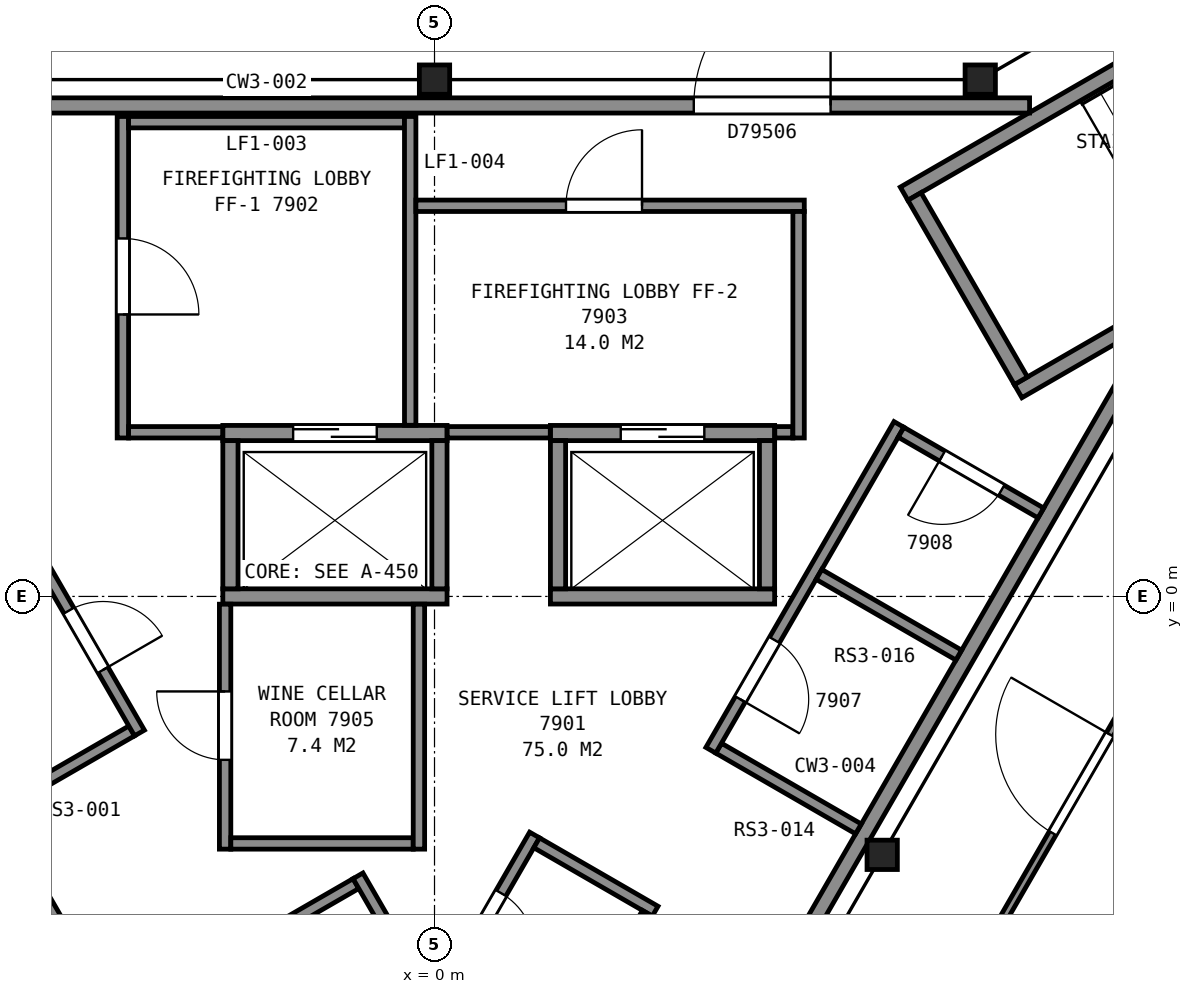
"""IFC4 building model, lengths in metres.
Left out: names, types, materials, properties, quantities, classifications, styles, units other than length and angle.
Written with IfcOpenShell. Run it as: python <this file> out.ifc"""

import sys

from ifc_helpers import new_model, si_unit, direction, frame, frame_2d, origin, origin_2d, place, context, subcontext, project, spatial, rectangle, i_section, extrude, element, fill, save


model = new_model("IFC4")
c1 = context("Model", 3, precision=1e-05, world=origin(), true_north=direction((0.0, 1.0)))
c2 = subcontext(c1, "Body", "Model", "MODEL_VIEW")
j1 = project(units=[si_unit("LENGTHUNIT", "METRE"), si_unit("PLANEANGLEUNIT", "RADIAN")], contexts=[c1])
p1 = place(None, origin())
s1 = spatial("IfcSite", under=j1, at=p1, CompositionType="ELEMENT")
p2 = place(p1, origin())
s2 = spatial("IfcBuilding", under=s1, at=p2, CompositionType="ELEMENT")
p3 = place(p2, frame((0.0, 0.0, 312.6)))
s3 = spatial("IfcBuildingStorey", under=s2, at=p3, CompositionType="ELEMENT", Elevation=312.6)
for number, where, z_axis, x_axis in (
    (1, (7.18, 6.8, 0.0), (0.0, 0.0, 1.0), (1.0, 0.0, 0.0)),
    (2, (0.0, 6.8, 0.0), (0.0, 0.0, 1.0), (1.0, 0.0, 0.0)),
    (3, (5.89, -3.4, 0.0), (0.0, 0.0, 1.0), (1.0, 0.0, 0.0)),
):
    element("IfcColumn", number, at=place(p3, frame(where, z_axis=z_axis, x_axis=x_axis)), inside=s3, PredefinedType="COLUMN", context=c2, shape_type="SweptSolid", body=[
        extrude(i_section(OverallWidth=0.399, OverallDepth=0.386, WebThickness=0.021, FlangeThickness=0.033, FilletRadius=0.015, at=origin_2d()), origin(), (0.0, 0.0, 1.0), 4.2),
    ])
for number, where, z_axis, x_axis in (
    (4, (6.178, 5.299, 0.0), (0.0, 0.0, 1.0), (0.866, 0.5, 0.0)),
    (5, (7.678, 2.701, 0.0), (0.0, 0.0, 1.0), (0.866, 0.5, 0.0)),
):
    element("IfcWall", number, at=place(p3, frame(where, z_axis=z_axis, x_axis=x_axis)), inside=s3, PredefinedType="PARTITIONING", context=c2, shape_type="SweptSolid", body=[
        extrude(rectangle(XDim=7.2, YDim=0.2, at=frame_2d((3.6, 0.0))), origin(), (0.0, 0.0, 1.0), 3.95),
    ])
p4 = place(p3, frame((7.715, 2.838, 0.0), z_axis=(0.0, 0.0, 1.0), x_axis=(-0.500049511043, 0.865996816683, 0.0)))
e6 = element("IfcWall", 6, at=p4, inside=s3, PredefinedType="PARTITIONING", context=c2, shape_type="SweptSolid", body=[
    extrude(rectangle(XDim=2.8, YDim=0.2, at=frame_2d((1.4, 0.0))), origin(), (0.0, 0.0, 1.0), 3.95),
])
p5 = place(p3, frame((-2.785, 0.0, 0.0), z_axis=(0.0, 0.0, 1.0), x_axis=(1.0, 0.0, 0.0)))
e7 = element("IfcWall", 7, at=p5, inside=s3, PredefinedType="PARTITIONING", context=c2, shape_type="SweptSolid", body=[
    extrude(rectangle(XDim=2.95, YDim=0.2, at=frame_2d((1.475, 0.0))), origin(), (0.0, 0.0, 1.0), 4.2),
])
p6 = place(p3, frame((1.525, 0.0, 0.0), z_axis=(0.0, 0.0, 1.0), x_axis=(1.0, 0.0, 0.0)))
e8 = element("IfcWall", 8, at=p6, inside=s3, PredefinedType="PARTITIONING", context=c2, shape_type="SweptSolid", body=[
    extrude(rectangle(XDim=2.95, YDim=0.2, at=frame_2d((1.475, 0.0))), origin(), (0.0, 0.0, 1.0), 4.2),
])
p7 = place(p3, frame((-2.785, 2.15, 0.0), z_axis=(0.0, 0.0, 1.0), x_axis=(1.0, 0.0, 0.0)))
e9 = element("IfcWall", 9, at=p7, inside=s3, PredefinedType="PARTITIONING", context=c2, shape_type="SweptSolid", body=[
    extrude(rectangle(XDim=2.95, YDim=0.2, at=frame_2d((1.475, 0.0))), origin(), (0.0, 0.0, 1.0), 4.2),
])
p8 = place(p7, frame((0.925, 0.0, 0.0)))
e10 = element("IfcOpeningElement", 10, at=p8, cuts=e9, PredefinedType="OPENING", context=c2, shape_type="SweptSolid", body=[
    extrude(rectangle(XDim=1.1, YDim=2.1, at=frame_2d((0.55, 1.05))), frame((0.0, 0.11, 0.0), z_axis=(0.0, -1.0, 0.0), x_axis=(1.0, 0.0, 0.0)), (0.0, 0.0, 1.0), 0.22),
])
p9 = place(p3, frame((1.525, 2.15, 0.0), z_axis=(0.0, 0.0, 1.0), x_axis=(1.0, 0.0, 0.0)))
e11 = element("IfcWall", 11, at=p9, inside=s3, PredefinedType="PARTITIONING", context=c2, shape_type="SweptSolid", body=[
    extrude(rectangle(XDim=2.95, YDim=0.2, at=frame_2d((1.475, 0.0))), origin(), (0.0, 0.0, 1.0), 4.2),
])
p10 = place(p9, frame((0.925, 0.0, 0.0)))
e12 = element("IfcOpeningElement", 12, at=p10, cuts=e11, PredefinedType="OPENING", context=c2, shape_type="SweptSolid", body=[
    extrude(rectangle(XDim=1.1, YDim=2.1, at=frame_2d((0.55, 1.05))), frame((0.0, 0.11, 0.0), z_axis=(0.0, -1.0, 0.0), x_axis=(1.0, 0.0, 0.0)), (0.0, 0.0, 1.0), 0.22),
])
for number, where, z_axis, x_axis in (
    (13, (4.375, 0.1, 0.0), (0.0, 0.0, 1.0), (0.0, 1.0, 0.0)),
    (14, (1.625, 0.1, 0.0), (0.0, 0.0, 1.0), (0.0, 1.0, 0.0)),
    (15, (0.065, 0.1, 0.0), (0.0, 0.0, 1.0), (0.0, 1.0, 0.0)),
    (16, (-2.685, 0.1, 0.0), (0.0, 0.0, 1.0), (0.0, 1.0, 0.0)),
):
    element("IfcWall", number, at=place(p3, frame(where, z_axis=z_axis, x_axis=x_axis)), inside=s3, PredefinedType="PARTITIONING", context=c2, shape_type="SweptSolid", body=[
        extrude(rectangle(XDim=1.95, YDim=0.2, at=frame_2d((0.975, 0.0))), origin(), (0.0, 0.0, 1.0), 4.2),
    ])
p11 = place(p3, frame((7.829, 6.46, 0.0), z_axis=(0.0, 0.0, 1.0), x_axis=(-1.0, 0.0, 0.0)))
e17 = element("IfcWall", 17, at=p11, inside=s3, PredefinedType="PARTITIONING", context=c2, shape_type="SweptSolid", body=[
    extrude(rectangle(XDim=15.658, YDim=0.2, at=frame_2d((7.829, 0.0))), origin(), (0.0, 0.0, 1.0), 3.95),
])
p12 = place(p11, frame((2.618, 0.0, 0.0)))
e18 = element("IfcOpeningElement", 18, at=p12, cuts=e17, PredefinedType="OPENING", context=c2, shape_type="SweptSolid", body=[
    extrude(rectangle(XDim=1.8, YDim=2.1, at=frame_2d((0.9, 1.05))), frame((0.0, 0.11, 0.0), z_axis=(0.0, -1.0, 0.0), x_axis=(1.0, 0.0, 0.0)), (0.0, 0.0, 1.0), 0.22),
])
p13 = place(p3, frame((-7.141, -0.551, 0.0), z_axis=(0.0, 0.0, 1.0), x_axis=(0.499992795234, -0.866029563418, 0.0)))
e19 = element("IfcWall", 19, at=p13, inside=s3, PredefinedType="PARTITIONING", context=c2, shape_type="SweptSolid", body=[
    extrude(rectangle(XDim=9.198, YDim=0.2, at=frame_2d((4.599, 0.0))), origin(), (0.0, 0.0, 1.0), 3.95),
])
p14 = place(p13, frame((4.634, 0.0, 0.0)))
e20 = element("IfcOpeningElement", 20, at=p14, cuts=e19, PredefinedType="OPENING", context=c2, shape_type="SweptSolid", body=[
    extrude(rectangle(XDim=1.8, YDim=2.1, at=frame_2d((0.9, 1.05))), frame((0.0, 0.11, 0.0), z_axis=(0.0, -1.0, 0.0), x_axis=(1.0, 0.0, 0.0)), (0.0, 0.0, 1.0), 0.22),
])
p15 = place(p3, frame((-5.737, -2.782, 0.0), z_axis=(0.0, 0.0, 1.0), x_axis=(0.866000843773, 0.500042536776, 0.0)))
e21 = element("IfcWall", 21, at=p15, inside=s3, PredefinedType="PARTITIONING", context=c2, shape_type="SweptSolid", body=[
    extrude(rectangle(XDim=2.025, YDim=0.15, at=frame_2d((1.012, 0.0))), origin(), (0.0, 0.0, 1.0), 3.95),
])
p16 = place(p3, frame((-3.882, -1.797, 0.0), z_axis=(0.0, 0.0, 1.0), x_axis=(-0.500016307898, 0.86601598821, 0.0)))
e22 = element("IfcWall", 22, at=p16, inside=s3, PredefinedType="PARTITIONING", context=c2, shape_type="SweptSolid", body=[
    extrude(rectangle(XDim=2.709, YDim=0.15, at=frame_2d((1.354, 0.0))), origin(), (0.0, 0.0, 1.0), 3.95),
])
p17 = place(p16, frame((0.959, 0.0, 0.0)))
e23 = element("IfcOpeningElement", 23, at=p17, cuts=e22, PredefinedType="OPENING", context=c2, shape_type="SweptSolid", body=[
    extrude(rectangle(XDim=0.9, YDim=2.1, at=frame_2d((0.45, 1.05))), frame((0.0, 0.085, 0.0), z_axis=(0.0, -1.0, 0.0), x_axis=(1.0, 0.0, 0.0)), (0.0, 0.0, 1.0), 0.17),
])
p18 = place(p3, frame((-4.1, 2.085, 0.0), z_axis=(0.0, 0.0, 1.0), x_axis=(0.0, 1.0, 0.0)))
e24 = element("IfcWall", 24, at=p18, inside=s3, PredefinedType="PARTITIONING", context=c2, shape_type="SweptSolid", body=[
    extrude(rectangle(XDim=4.23, YDim=0.15, at=frame_2d((2.115, 0.0))), origin(), (0.0, 0.0, 1.0), 3.95),
])
p19 = place(p18, frame((1.625, 0.0, 0.0)))
e25 = element("IfcOpeningElement", 25, at=p19, cuts=e24, PredefinedType="OPENING", context=c2, shape_type="SweptSolid", body=[
    extrude(rectangle(XDim=1.0, YDim=2.1, at=frame_2d((0.5, 1.05))), frame((0.0, 0.085, 0.0), z_axis=(0.0, -1.0, 0.0), x_axis=(1.0, 0.0, 0.0)), (0.0, 0.0, 1.0), 0.17),
])
p20 = place(p3, frame((-4.025, 2.16, 0.0), z_axis=(0.0, 0.0, 1.0), x_axis=(1.0, 0.0, 0.0)))
e26 = element("IfcWall", 26, at=p20, inside=s3, PredefinedType="PARTITIONING", context=c2, shape_type="SweptSolid", body=[
    extrude(rectangle(XDim=1.238, YDim=0.15, at=frame_2d((0.619, 0.0))), origin(), (0.0, 0.0, 1.0), 3.95),
])
p21 = place(p3, frame((-4.025, 6.24, 0.0), z_axis=(0.0, 0.0, 1.0), x_axis=(1.0, 0.0, 0.0)))
e27 = element("IfcWall", 27, at=p21, inside=s3, PredefinedType="PARTITIONING", context=c2, shape_type="SweptSolid", body=[
    extrude(rectangle(XDim=3.63, YDim=0.15, at=frame_2d((1.815, 0.0))), origin(), (0.0, 0.0, 1.0), 3.95),
])
p22 = place(p3, frame((-2.755, -0.102, 0.0), z_axis=(0.0, 0.0, 1.0), x_axis=(0.0, -1.0, 0.0)))
e28 = element("IfcWall", 28, at=p22, inside=s3, PredefinedType="PARTITIONING", context=c2, shape_type="SweptSolid", body=[
    extrude(rectangle(XDim=3.223, YDim=0.15, at=frame_2d((1.611, 0.0))), origin(), (0.0, 0.0, 1.0), 3.95),
])
p23 = place(p22, frame((1.148, 0.0, 0.0)))
e29 = element("IfcOpeningElement", 29, at=p23, cuts=e28, PredefinedType="OPENING", context=c2, shape_type="SweptSolid", body=[
    extrude(rectangle(XDim=0.9, YDim=2.1, at=frame_2d((0.45, 1.05))), frame((0.0, 0.085, 0.0), z_axis=(0.0, -1.0, 0.0), x_axis=(1.0, 0.0, 0.0)), (0.0, 0.0, 1.0), 0.17),
])
p24 = place(p3, frame((-2.68, -3.25, 0.0), z_axis=(0.0, 0.0, 1.0), x_axis=(1.0, 0.0, 0.0)))
e30 = element("IfcWall", 30, at=p24, inside=s3, PredefinedType="PARTITIONING", context=c2, shape_type="SweptSolid", body=[
    extrude(rectangle(XDim=2.4, YDim=0.15, at=frame_2d((1.2, 0.0))), origin(), (0.0, 0.0, 1.0), 3.95),
])
p25 = place(p3, frame((-2.593, -4.678, 0.0), z_axis=(0.0, 0.0, 1.0), x_axis=(0.866081705922, 0.499902469156, 0.0)))
e31 = element("IfcWall", 31, at=p25, inside=s3, PredefinedType="PARTITIONING", context=c2, shape_type="SweptSolid", body=[
    extrude(rectangle(XDim=1.8, YDim=0.15, at=frame_2d((0.9, 0.0))), origin(), (0.0, 0.0, 1.0), 3.95),
])
p26 = place(p3, frame((-1.007, -3.676, 0.0), z_axis=(0.0, 0.0, 1.0), x_axis=(0.500037662692, -0.866003658127, 0.0)))
e32 = element("IfcWall", 32, at=p26, inside=s3, PredefinedType="PARTITIONING", context=c2, shape_type="SweptSolid", body=[
    extrude(rectangle(XDim=4.425, YDim=0.15, at=frame_2d((2.212, 0.0))), origin(), (0.0, 0.0, 1.0), 3.95),
])
p27 = place(p3, frame((-0.32, 2.252, 0.0), z_axis=(0.0, 0.0, 1.0), x_axis=(0.0, 1.0, 0.0)))
e33 = element("IfcWall", 33, at=p27, inside=s3, PredefinedType="PARTITIONING", context=c2, shape_type="SweptSolid", body=[
    extrude(rectangle(XDim=4.063, YDim=0.15, at=frame_2d((2.031, 0.0))), origin(), (0.0, 0.0, 1.0), 3.95),
])
p28 = place(p3, frame((-0.245, 5.14, 0.0), z_axis=(0.0, 0.0, 1.0), x_axis=(1.0, 0.0, 0.0)))
e34 = element("IfcWall", 34, at=p28, inside=s3, PredefinedType="PARTITIONING", context=c2, shape_type="SweptSolid", body=[
    extrude(rectangle(XDim=5.11, YDim=0.15, at=frame_2d((2.555, 0.0))), origin(), (0.0, 0.0, 1.0), 3.95),
])
p29 = place(p28, frame((1.975, 0.0, 0.0)))
e35 = element("IfcOpeningElement", 35, at=p29, cuts=e34, PredefinedType="OPENING", context=c2, shape_type="SweptSolid", body=[
    extrude(rectangle(XDim=1.0, YDim=2.1, at=frame_2d((0.5, 1.05))), frame((0.0, 0.085, 0.0), z_axis=(0.0, -1.0, 0.0), x_axis=(1.0, 0.0, 0.0)), (0.0, 0.0, 1.0), 0.17),
])
p30 = place(p3, frame((-0.205, -3.325, 0.0), z_axis=(0.0, 0.0, 1.0), x_axis=(0.0, 1.0, 0.0)))
e36 = element("IfcWall", 36, at=p30, inside=s3, PredefinedType="PARTITIONING", context=c2, shape_type="SweptSolid", body=[
    extrude(rectangle(XDim=3.223, YDim=0.15, at=frame_2d((1.611, 0.0))), origin(), (0.0, 0.0, 1.0), 3.95),
])
p31 = place(p3, frame((1.316, -3.139, 0.0), z_axis=(0.0, 0.0, 1.0), x_axis=(-0.500063042646, -0.865989003036, 0.0)))
e37 = element("IfcWall", 37, at=p31, inside=s3, PredefinedType="PARTITIONING", context=c2, shape_type="SweptSolid", body=[
    extrude(rectangle(XDim=2.503, YDim=0.15, at=frame_2d((1.251, 0.0))), origin(), (0.0, 0.0, 1.0), 3.95),
])
p32 = place(p31, frame((0.883, 0.0, 0.0)))
e38 = element("IfcOpeningElement", 38, at=p32, cuts=e37, PredefinedType="OPENING", context=c2, shape_type="SweptSolid", body=[
    extrude(rectangle(XDim=0.9, YDim=2.1, at=frame_2d((0.45, 1.05))), frame((0.0, 0.085, 0.0), z_axis=(0.0, -1.0, 0.0), x_axis=(1.0, 0.0, 0.0)), (0.0, 0.0, 1.0), 0.17),
])
p33 = place(p3, frame((0.167, 2.16, 0.0), z_axis=(0.0, 0.0, 1.0), x_axis=(1.0, 0.0, 0.0)))
e39 = element("IfcWall", 39, at=p33, inside=s3, PredefinedType="PARTITIONING", context=c2, shape_type="SweptSolid", body=[
    extrude(rectangle(XDim=1.356, YDim=0.15, at=frame_2d((0.678, 0.0))), origin(), (0.0, 0.0, 1.0), 3.95),
])
p34 = place(p3, frame((1.344, -3.241, 0.0), z_axis=(0.0, 0.0, 1.0), x_axis=(0.865989075817, -0.500062916607, 0.0)))
e40 = element("IfcWall", 40, at=p34, inside=s3, PredefinedType="PARTITIONING", context=c2, shape_type="SweptSolid", body=[
    extrude(rectangle(XDim=1.8, YDim=0.15, at=frame_2d((0.9, 0.0))), origin(), (0.0, 0.0, 1.0), 3.95),
])
p35 = place(p3, frame((2.176, -5.251, 0.0), z_axis=(0.0, 0.0, 1.0), x_axis=(0.500173430036, 0.86592525075, 0.0)))
e41 = element("IfcWall", 41, at=p35, inside=s3, PredefinedType="PARTITIONING", context=c2, shape_type="SweptSolid", body=[
    extrude(rectangle(XDim=1.25, YDim=0.15, at=frame_2d((0.625, 0.0))), origin(), (0.0, 0.0, 1.0), 3.95),
])
p36 = place(p3, frame((2.552, -8.5, 0.0), z_axis=(0.0, 0.0, 1.0), x_axis=(0.499981156672, 0.866036282712, 0.0)))
e42 = element("IfcWall", 42, at=p36, inside=s3, PredefinedType="PARTITIONING", context=c2, shape_type="SweptSolid", body=[
    extrude(rectangle(XDim=13.915, YDim=0.2, at=frame_2d((6.957, 0.0))), origin(), (0.0, 0.0, 1.0), 3.95),
])
p37 = place(p3, frame((3.738, -1.997, 0.0), z_axis=(0.0, 0.0, 1.0), x_axis=(0.865913749133, -0.500193341681, 0.0)))
e43 = element("IfcWall", 43, at=p37, inside=s3, PredefinedType="PARTITIONING", context=c2, shape_type="SweptSolid", body=[
    extrude(rectangle(XDim=2.124, YDim=0.15, at=frame_2d((1.062, 0.0))), origin(), (0.0, 0.0, 1.0), 3.95),
])
p38 = place(p3, frame((6.111, 2.263, 0.0), z_axis=(0.0, 0.0, 1.0), x_axis=(-0.500011342071, -0.866018855338, 0.0)))
e44 = element("IfcWall", 44, at=p38, inside=s3, PredefinedType="PARTITIONING", context=c2, shape_type="SweptSolid", body=[
    extrude(rectangle(XDim=4.95, YDim=0.15, at=frame_2d((2.475, 0.0))), origin(), (0.0, 0.0, 1.0), 3.95),
])
p39 = place(p38, frame((3.275, 0.0, 0.0)))
e45 = element("IfcOpeningElement", 45, at=p39, cuts=e44, PredefinedType="OPENING", context=c2, shape_type="SweptSolid", body=[
    extrude(rectangle(XDim=0.9, YDim=2.1, at=frame_2d((0.45, 1.05))), frame((0.0, 0.085, 0.0), z_axis=(0.0, -1.0, 0.0), x_axis=(1.0, 0.0, 0.0)), (0.0, 0.0, 1.0), 0.17),
])
p40 = place(p3, frame((4.477, 2.16, 0.0), z_axis=(0.0, 0.0, 1.0), x_axis=(1.0, 0.0, 0.0)))
e46 = element("IfcWall", 46, at=p40, inside=s3, PredefinedType="PARTITIONING", context=c2, shape_type="SweptSolid", body=[
    extrude(rectangle(XDim=0.238, YDim=0.15, at=frame_2d((0.119, 0.0))), origin(), (0.0, 0.0, 1.0), 3.95),
])
p41 = place(p3, frame((4.79, 2.085, 0.0), z_axis=(0.0, 0.0, 1.0), x_axis=(0.0, 1.0, 0.0)))
e47 = element("IfcWall", 47, at=p41, inside=s3, PredefinedType="PARTITIONING", context=c2, shape_type="SweptSolid", body=[
    extrude(rectangle(XDim=2.98, YDim=0.15, at=frame_2d((1.49, 0.0))), origin(), (0.0, 0.0, 1.0), 3.95),
])
p42 = place(p3, frame((5.058, 0.29, 0.0), z_axis=(0.0, 0.0, 1.0), x_axis=(0.866141567767, -0.499798744081, 0.0)))
e48 = element("IfcWall", 48, at=p42, inside=s3, PredefinedType="PARTITIONING", context=c2, shape_type="SweptSolid", body=[
    extrude(rectangle(XDim=2.124, YDim=0.15, at=frame_2d((1.062, 0.0))), origin(), (0.0, 0.0, 1.0), 3.95),
])
p43 = place(p3, frame((7.977, 1.098, 0.0), z_axis=(0.0, 0.0, 1.0), x_axis=(-0.865913749133, 0.500193341681, 0.0)))
e49 = element("IfcWall", 49, at=p43, inside=s3, PredefinedType="PARTITIONING", context=c2, shape_type="SweptSolid", body=[
    extrude(rectangle(XDim=2.124, YDim=0.15, at=frame_2d((1.062, 0.0))), origin(), (0.0, 0.0, 1.0), 3.95),
])
p44 = place(p43, frame((0.599, 0.0, 0.0)))
e50 = element("IfcOpeningElement", 50, at=p44, cuts=e49, PredefinedType="OPENING", context=c2, shape_type="SweptSolid", body=[
    extrude(rectangle(XDim=0.9, YDim=2.1, at=frame_2d((0.45, 1.05))), frame((0.0, 0.085, 0.0), z_axis=(0.0, -1.0, 0.0), x_axis=(1.0, 0.0, 0.0)), (0.0, 0.0, 1.0), 0.17),
])
p45 = place(p3, frame((-4.075, -10.145, 0.0), z_axis=(0.0, 0.0, 1.0), x_axis=(-0.499912942625, 0.866075660549, 0.0)))
e51 = element("IfcWall", 51, at=p45, inside=s3, PredefinedType="PARTITIONING", context=c2, shape_type="SweptSolid", body=[
    extrude(rectangle(XDim=13.499, YDim=0.1, at=frame_2d((6.749, 0.0))), origin(), (0.0, 0.0, 1.0), 3.297),
])
p46 = place(p45, frame((6.548, 0.0, 0.0)))
e52 = element("IfcOpeningElement", 52, at=p46, cuts=e51, PredefinedType="OPENING", context=c2, shape_type="SweptSolid", body=[
    extrude(rectangle(XDim=1.5, YDim=2.1, at=frame_2d((0.75, 1.05))), frame((0.0, 0.06, 0.0), z_axis=(0.0, -1.0, 0.0), x_axis=(1.0, 0.0, 0.0)), (0.0, 0.0, 1.0), 0.12),
])
p47 = place(p3, frame((10.823, 1.545, 0.0), z_axis=(0.0, 0.0, 1.0), x_axis=(-0.499912942625, -0.866075660549, 0.0)))
e53 = element("IfcWall", 53, at=p47, inside=s3, PredefinedType="PARTITIONING", context=c2, shape_type="SweptSolid", body=[
    extrude(rectangle(XDim=13.499, YDim=0.1, at=frame_2d((6.749, 0.0))), origin(), (0.0, 0.0, 1.0), 3.297),
])
p48 = place(p47, frame((3.88, 0.0, 0.0)))
e54 = element("IfcOpeningElement", 54, at=p48, cuts=e53, PredefinedType="OPENING", context=c2, shape_type="SweptSolid", body=[
    extrude(rectangle(XDim=1.5, YDim=2.1, at=frame_2d((0.75, 1.05))), frame((0.0, 0.06, 0.0), z_axis=(0.0, -1.0, 0.0), x_axis=(1.0, 0.0, 0.0)), (0.0, 0.0, 1.0), 0.12),
])
p49 = place(p8, origin())
e55 = element("IfcDoor", 55, at=p49, inside=s3, OperationType="SLIDING_TO_LEFT", PredefinedType="DOOR", context=c2, shape_type="SweptSolid", body=[
    extrude(rectangle(XDim=1.1, YDim=2.1, at=frame_2d((0.55, 1.05))), frame((0.0, 0.025, 0.0), z_axis=(0.0, -1.0, 0.0), x_axis=(1.0, 0.0, 0.0)), (0.0, 0.0, 1.0), 0.05),
])
fill(e10, e55)
p50 = place(p10, origin())
e56 = element("IfcDoor", 56, at=p50, inside=s3, OperationType="SLIDING_TO_RIGHT", PredefinedType="DOOR", context=c2, shape_type="SweptSolid", body=[
    extrude(rectangle(XDim=1.1, YDim=2.1, at=frame_2d((0.55, 1.05))), frame((0.0, 0.025, 0.0), z_axis=(0.0, -1.0, 0.0), x_axis=(1.0, 0.0, 0.0)), (0.0, 0.0, 1.0), 0.05),
])
fill(e12, e56)
p51 = place(p12, origin())
e57 = element("IfcDoor", 57, at=p51, inside=s3, OperationType="DOUBLE_DOOR_SINGLE_SWING", PredefinedType="DOOR", context=c2, shape_type="SweptSolid", body=[
    extrude(rectangle(XDim=1.8, YDim=2.1, at=frame_2d((0.9, 1.05))), frame((0.0, 0.025, 0.0), z_axis=(0.0, -1.0, 0.0), x_axis=(1.0, 0.0, 0.0)), (0.0, 0.0, 1.0), 0.05),
])
fill(e18, e57)
p52 = place(p17, origin())
e58 = element("IfcDoor", 58, at=p52, inside=s3, OperationType="SINGLE_SWING_LEFT", PredefinedType="DOOR", context=c2, shape_type="SweptSolid", body=[
    extrude(rectangle(XDim=0.9, YDim=2.1, at=frame_2d((0.45, 1.05))), frame((0.0, 0.025, 0.0), z_axis=(0.0, -1.0, 0.0), x_axis=(1.0, 0.0, 0.0)), (0.0, 0.0, 1.0), 0.05),
])
fill(e23, e58)
p53 = place(p19, origin())
e59 = element("IfcDoor", 59, at=p53, inside=s3, OperationType="SINGLE_SWING_LEFT", PredefinedType="DOOR", context=c2, shape_type="SweptSolid", body=[
    extrude(rectangle(XDim=1.0, YDim=2.1, at=frame_2d((0.5, 1.05))), frame((0.0, 0.025, 0.0), z_axis=(0.0, -1.0, 0.0), x_axis=(1.0, 0.0, 0.0)), (0.0, 0.0, 1.0), 0.05),
])
fill(e25, e59)
p54 = place(p23, origin())
e60 = element("IfcDoor", 60, at=p54, inside=s3, OperationType="SINGLE_SWING_LEFT", PredefinedType="DOOR", context=c2, shape_type="SweptSolid", body=[
    extrude(rectangle(XDim=0.9, YDim=2.1, at=frame_2d((0.45, 1.05))), frame((0.0, 0.025, 0.0), z_axis=(0.0, -1.0, 0.0), x_axis=(1.0, 0.0, 0.0)), (0.0, 0.0, 1.0), 0.05),
])
fill(e29, e60)
p55 = place(p29, origin())
e61 = element("IfcDoor", 61, at=p55, inside=s3, OperationType="SINGLE_SWING_RIGHT", PredefinedType="DOOR", context=c2, shape_type="SweptSolid", body=[
    extrude(rectangle(XDim=1.0, YDim=2.1, at=frame_2d((0.5, 1.05))), frame((0.0, 0.025, 0.0), z_axis=(0.0, -1.0, 0.0), x_axis=(1.0, 0.0, 0.0)), (0.0, 0.0, 1.0), 0.05),
])
fill(e35, e61)
p56 = place(p32, origin())
e62 = element("IfcDoor", 62, at=p56, inside=s3, OperationType="SINGLE_SWING_RIGHT", PredefinedType="DOOR", context=c2, shape_type="SweptSolid", body=[
    extrude(rectangle(XDim=0.9, YDim=2.1, at=frame_2d((0.45, 1.05))), frame((0.0, 0.025, 0.0), z_axis=(0.0, -1.0, 0.0), x_axis=(1.0, 0.0, 0.0)), (0.0, 0.0, 1.0), 0.05),
])
fill(e38, e62)
p57 = place(p39, origin())
e63 = element("IfcDoor", 63, at=p57, inside=s3, OperationType="SINGLE_SWING_RIGHT", PredefinedType="DOOR", context=c2, shape_type="SweptSolid", body=[
    extrude(rectangle(XDim=0.9, YDim=2.1, at=frame_2d((0.45, 1.05))), frame((0.0, 0.025, 0.0), z_axis=(0.0, -1.0, 0.0), x_axis=(1.0, 0.0, 0.0)), (0.0, 0.0, 1.0), 0.05),
])
fill(e45, e63)
p58 = place(p44, origin())
e64 = element("IfcDoor", 64, at=p58, inside=s3, OperationType="SINGLE_SWING_RIGHT", PredefinedType="DOOR", context=c2, shape_type="SweptSolid", body=[
    extrude(rectangle(XDim=0.9, YDim=2.1, at=frame_2d((0.45, 1.05))), frame((0.0, 0.025, 0.0), z_axis=(0.0, -1.0, 0.0), x_axis=(1.0, 0.0, 0.0)), (0.0, 0.0, 1.0), 0.05),
])
fill(e50, e64)
p59 = place(p48, origin())
e65 = element("IfcDoor", 65, at=p59, inside=s3, OperationType="DOUBLE_DOOR_SINGLE_SWING", PredefinedType="DOOR", context=c2, shape_type="SweptSolid", body=[
    extrude(rectangle(XDim=1.5, YDim=2.1, at=frame_2d((0.75, 1.05))), frame((0.0, 0.025, 0.0), z_axis=(0.0, -1.0, 0.0), x_axis=(1.0, 0.0, 0.0)), (0.0, 0.0, 1.0), 0.05),
])
fill(e54, e65)
save(model, sys.argv[1])
